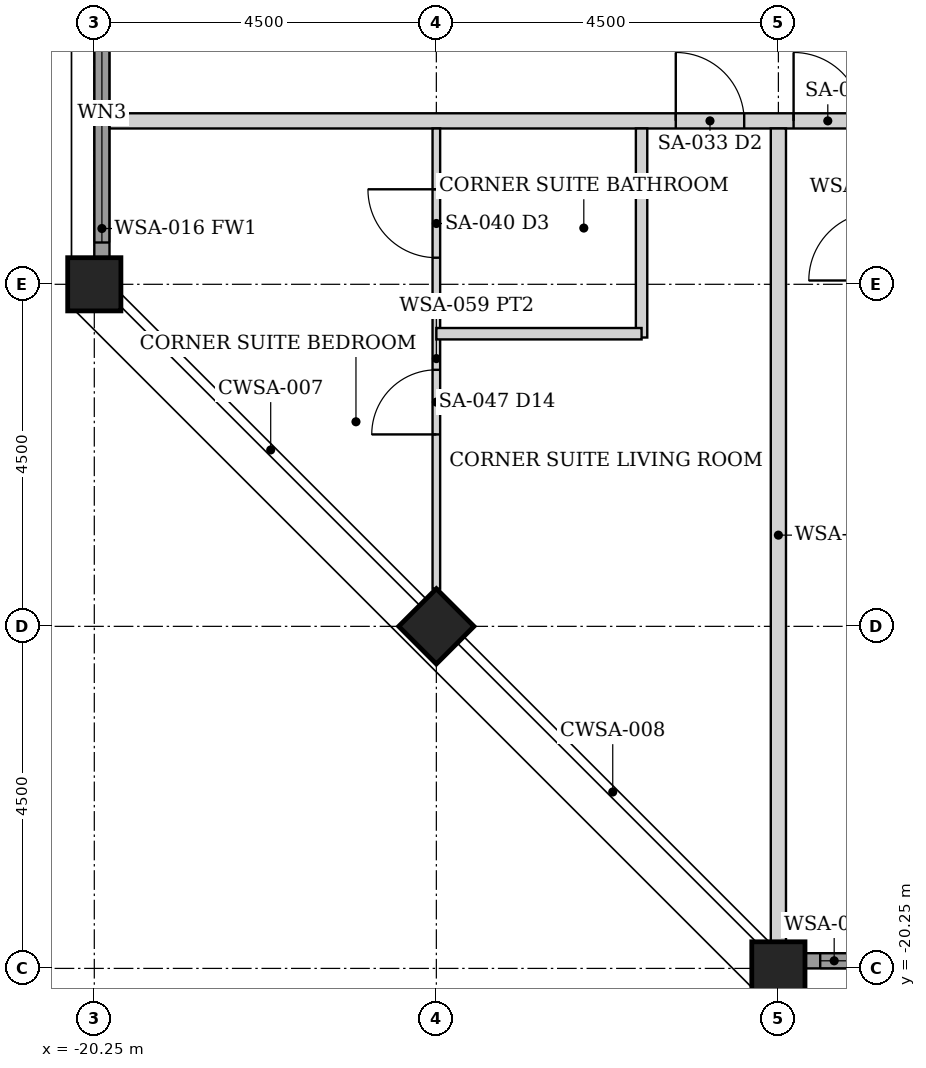
"""IFC4 building model, lengths in metres.
Left out: names, types, materials, properties, quantities, classifications, styles, units other than length and angle.
Written with IfcOpenShell. Run it as: python <this file> out.ifc"""

import sys

from ifc_helpers import new_model, si_unit, direction, frame, frame_2d, origin, origin_2d, place, context, subcontext, project, spatial, rectangle, hollow_rectangle, extrude, element, fill, save


model = new_model("IFC4")
c1 = context("Model", 3, precision=1e-05, world=origin(), true_north=direction((0.0, 1.0)))
c2 = subcontext(c1, "Body", "Model", "MODEL_VIEW")
j1 = project(units=[si_unit("LENGTHUNIT", "METRE"), si_unit("PLANEANGLEUNIT", "RADIAN")], contexts=[c1])
p1 = place(None, origin())
s1 = spatial("IfcSite", under=j1, at=p1, CompositionType="ELEMENT")
p2 = place(p1, origin())
s2 = spatial("IfcBuilding", under=s1, at=p2, CompositionType="ELEMENT")
p3 = place(p2, frame((0.0, 0.0, 200.8)))
s3 = spatial("IfcBuildingStorey", under=s2, at=p3, CompositionType="ELEMENT", Elevation=200.8)
for number, where, z_axis, x_axis in (
    (1, (-11.25, -20.25, 0.0), (0.0, 0.0, 1.0), (0.0, 1.0, 0.0)),
    (2, (-20.25, -11.25, 0.0), (0.0, 0.0, 1.0), (1.0, 0.0, 0.0)),
    (3, (-15.75, -15.75, 0.0), (0.0, 0.0, 1.0), (0.707, 0.707, 0.0)),
):
    element("IfcColumn", number, at=place(p3, frame(where, z_axis=z_axis, x_axis=x_axis)), inside=s3, PredefinedType="COLUMN", context=c2, shape_type="SweptSolid", body=[
        extrude(hollow_rectangle(XDim=0.7, YDim=0.7, WallThickness=0.045, at=origin_2d()), origin(), (0.0, 0.0, 1.0), 3.75),
    ])
p4 = place(p3, frame((-10.895, -20.15, 0.0), z_axis=(0.0, 0.0, 1.0), x_axis=(1.0, 0.0, 0.0)))
e4 = element("IfcWall", 4, at=p4, inside=s3, PredefinedType="SOLIDWALL", context=c2, shape_type="SweptSolid", body=[
    extrude(rectangle(XDim=3.79, YDim=0.2, at=frame_2d((1.895, 0.0))), origin(), (0.0, 0.0, 1.0), 2.629),
])
p5 = place(p4, frame((0.195, 0.0, 0.3)))
e5 = element("IfcOpeningElement", 5, at=p5, cuts=e4, PredefinedType="OPENING", context=c2, shape_type="SweptSolid", body=[
    extrude(rectangle(XDim=3.4, YDim=2.179, at=frame_2d((1.7, 1.089))), frame((0.0, 0.11, 0.0), z_axis=(0.0, -1.0, 0.0), x_axis=(1.0, 0.0, 0.0)), (0.0, 0.0, 1.0), 0.22),
])
p6 = place(p3, frame((-20.15, -10.895, 0.0), z_axis=(0.0, 0.0, 1.0), x_axis=(0.0, 1.0, 0.0)))
e6 = element("IfcWall", 6, at=p6, inside=s3, PredefinedType="SOLIDWALL", context=c2, shape_type="SweptSolid", body=[
    extrude(rectangle(XDim=3.79, YDim=0.2, at=frame_2d((1.895, 0.0))), origin(), (0.0, 0.0, 1.0), 2.629),
])
p7 = place(p6, frame((0.195, 0.0, 0.3)))
e7 = element("IfcOpeningElement", 7, at=p7, cuts=e6, PredefinedType="OPENING", context=c2, shape_type="SweptSolid", body=[
    extrude(rectangle(XDim=3.4, YDim=2.179, at=frame_2d((1.7, 1.089))), frame((0.0, 0.11, 0.0), z_axis=(0.0, -1.0, 0.0), x_axis=(1.0, 0.0, 0.0)), (0.0, 0.0, 1.0), 0.22),
])
p8 = place(p3, frame((-20.05, -9.1, 0.0), z_axis=(0.0, 0.0, 1.0), x_axis=(1.0, 0.0, 0.0)))
e8 = element("IfcWall", 8, at=p8, inside=s3, PredefinedType="PARTITIONING", context=c2, shape_type="SweptSolid", body=[
    extrude(rectangle(XDim=40.1, YDim=0.2, at=frame_2d((20.05, 0.0))), origin(), (0.0, 0.0, 1.0), 2.629),
])
p9 = place(p8, frame((9.0, 0.0, 0.0)))
e9 = element("IfcOpeningElement", 9, at=p9, cuts=e8, PredefinedType="OPENING", context=c2, shape_type="SweptSolid", body=[
    extrude(rectangle(XDim=0.9, YDim=2.1, at=frame_2d((0.45, 1.05))), frame((0.0, 0.11, 0.0), z_axis=(0.0, -1.0, 0.0), x_axis=(1.0, 0.0, 0.0)), (0.0, 0.0, 1.0), 0.22),
])
p10 = place(p8, frame((13.5, 0.0, 0.0)))
e10 = element("IfcOpeningElement", 10, at=p10, cuts=e8, PredefinedType="OPENING", context=c2, shape_type="SweptSolid", body=[
    extrude(rectangle(XDim=0.9, YDim=2.1, at=frame_2d((0.45, 1.05))), frame((0.0, 0.11, 0.0), z_axis=(0.0, -1.0, 0.0), x_axis=(1.0, 0.0, 0.0)), (0.0, 0.0, 1.0), 0.22),
])
p11 = place(p8, frame((18.0, 0.0, 0.0)))
e11 = element("IfcOpeningElement", 11, at=p11, cuts=e8, PredefinedType="OPENING", context=c2, shape_type="SweptSolid", body=[
    extrude(rectangle(XDim=0.9, YDim=2.1, at=frame_2d((0.45, 1.05))), frame((0.0, 0.11, 0.0), z_axis=(0.0, -1.0, 0.0), x_axis=(1.0, 0.0, 0.0)), (0.0, 0.0, 1.0), 0.22),
])
p12 = place(p8, frame((22.5, 0.0, 0.0)))
e12 = element("IfcOpeningElement", 12, at=p12, cuts=e8, PredefinedType="OPENING", context=c2, shape_type="SweptSolid", body=[
    extrude(rectangle(XDim=0.9, YDim=2.1, at=frame_2d((0.45, 1.05))), frame((0.0, 0.11, 0.0), z_axis=(0.0, -1.0, 0.0), x_axis=(1.0, 0.0, 0.0)), (0.0, 0.0, 1.0), 0.22),
])
p13 = place(p8, frame((27.0, 0.0, 0.0)))
e13 = element("IfcOpeningElement", 13, at=p13, cuts=e8, PredefinedType="OPENING", context=c2, shape_type="SweptSolid", body=[
    extrude(rectangle(XDim=0.9, YDim=2.1, at=frame_2d((0.45, 1.05))), frame((0.0, 0.11, 0.0), z_axis=(0.0, -1.0, 0.0), x_axis=(1.0, 0.0, 0.0)), (0.0, 0.0, 1.0), 0.22),
])
p14 = place(p8, frame((31.75, 0.0, 0.0)))
e14 = element("IfcOpeningElement", 14, at=p14, cuts=e8, PredefinedType="OPENING", context=c2, shape_type="SweptSolid", body=[
    extrude(rectangle(XDim=0.9, YDim=2.1, at=frame_2d((0.45, 1.05))), frame((0.0, 0.11, 0.0), z_axis=(0.0, -1.0, 0.0), x_axis=(1.0, 0.0, 0.0)), (0.0, 0.0, 1.0), 0.22),
])
p15 = place(p8, frame((7.45, 0.0, 0.0)))
e15 = element("IfcOpeningElement", 15, at=p15, cuts=e8, PredefinedType="OPENING", context=c2, shape_type="SweptSolid", body=[
    extrude(rectangle(XDim=0.9, YDim=2.1, at=frame_2d((0.45, 1.05))), frame((0.0, 0.11, 0.0), z_axis=(0.0, -1.0, 0.0), x_axis=(1.0, 0.0, 0.0)), (0.0, 0.0, 1.0), 0.22),
])
p16 = place(p3, frame((-11.25, -19.9, 0.0), z_axis=(0.0, 0.0, 1.0), x_axis=(0.0, 1.0, 0.0)))
e16 = element("IfcWall", 16, at=p16, inside=s3, PredefinedType="PARTITIONING", context=c2, shape_type="SweptSolid", body=[
    extrude(rectangle(XDim=10.7, YDim=0.2, at=frame_2d((5.35, 0.0))), origin(), (0.0, 0.0, 1.0), 2.629),
])
p17 = place(p3, frame((-15.75, -15.255, 0.0), z_axis=(0.0, 0.0, 1.0), x_axis=(0.0, 1.0, 0.0)))
e17 = element("IfcWall", 17, at=p17, inside=s3, PredefinedType="PARTITIONING", context=c2, shape_type="SweptSolid", body=[
    extrude(rectangle(XDim=6.055, YDim=0.1, at=frame_2d((3.027, 0.0))), origin(), (0.0, 0.0, 1.0), 2.629),
])
p18 = place(p17, frame((2.03, 0.0, 0.0)))
e18 = element("IfcOpeningElement", 18, at=p18, cuts=e17, PredefinedType="OPENING", context=c2, shape_type="SweptSolid", body=[
    extrude(rectangle(XDim=0.85, YDim=2.1, at=frame_2d((0.425, 1.05))), frame((0.0, 0.06, 0.0), z_axis=(0.0, -1.0, 0.0), x_axis=(1.0, 0.0, 0.0)), (0.0, 0.0, 1.0), 0.12),
])
p19 = place(p17, frame((4.355, 0.0, 0.0)))
e19 = element("IfcOpeningElement", 19, at=p19, cuts=e17, PredefinedType="OPENING", context=c2, shape_type="SweptSolid", body=[
    extrude(rectangle(XDim=0.9, YDim=2.1, at=frame_2d((0.45, 1.05))), frame((0.0, 0.06, 0.0), z_axis=(0.0, -1.0, 0.0), x_axis=(1.0, 0.0, 0.0)), (0.0, 0.0, 1.0), 0.12),
])
p20 = place(p3, frame((-13.05, -11.95, 0.0), z_axis=(0.0, 0.0, 1.0), x_axis=(0.0, 1.0, 0.0)))
e20 = element("IfcWall", 20, at=p20, inside=s3, PredefinedType="PARTITIONING", context=c2, shape_type="SweptSolid", body=[
    extrude(rectangle(XDim=2.75, YDim=0.15, at=frame_2d((1.375, 0.0))), origin(), (0.0, 0.0, 1.0), 2.629),
])
p21 = place(p3, frame((-15.75, -11.9, 0.0), z_axis=(0.0, 0.0, 1.0), x_axis=(1.0, 0.0, 0.0)))
e21 = element("IfcWall", 21, at=p21, inside=s3, PredefinedType="PARTITIONING", context=c2, shape_type="SweptSolid", body=[
    extrude(rectangle(XDim=2.7, YDim=0.15, at=frame_2d((1.35, 0.0))), origin(), (0.0, 0.0, 1.0), 2.629),
])
p22 = place(p5, origin())
e22 = element("IfcWindow", 22, at=p22, inside=s3, PartitioningType="SINGLE_PANEL", PredefinedType="WINDOW", context=c2, shape_type="SweptSolid", body=[
    extrude(rectangle(XDim=3.4, YDim=2.179, at=frame_2d((1.7, 1.089))), frame((0.0, 0.03, 0.0), z_axis=(0.0, -1.0, 0.0), x_axis=(1.0, 0.0, 0.0)), (0.0, 0.0, 1.0), 0.06),
])
fill(e5, e22)
p23 = place(p7, origin())
e23 = element("IfcWindow", 23, at=p23, inside=s3, PartitioningType="SINGLE_PANEL", PredefinedType="WINDOW", context=c2, shape_type="SweptSolid", body=[
    extrude(rectangle(XDim=3.4, YDim=2.179, at=frame_2d((1.7, 1.089))), frame((0.0, 0.03, 0.0), z_axis=(0.0, -1.0, 0.0), x_axis=(1.0, 0.0, 0.0)), (0.0, 0.0, 1.0), 0.06),
])
fill(e7, e23)
p24 = place(p9, origin())
e24 = element("IfcDoor", 24, at=p24, inside=s3, OperationType="SINGLE_SWING_LEFT", PredefinedType="DOOR", context=c2, shape_type="SweptSolid", body=[
    extrude(rectangle(XDim=0.9, YDim=2.1, at=frame_2d((0.45, 1.05))), frame((0.0, 0.025, 0.0), z_axis=(0.0, -1.0, 0.0), x_axis=(1.0, 0.0, 0.0)), (0.0, 0.0, 1.0), 0.05),
])
fill(e9, e24)
p25 = place(p15, origin())
e25 = element("IfcDoor", 25, at=p25, inside=s3, OperationType="SINGLE_SWING_LEFT", PredefinedType="DOOR", context=c2, shape_type="SweptSolid", body=[
    extrude(rectangle(XDim=0.9, YDim=2.1, at=frame_2d((0.45, 1.05))), frame((0.0, 0.025, 0.0), z_axis=(0.0, -1.0, 0.0), x_axis=(1.0, 0.0, 0.0)), (0.0, 0.0, 1.0), 0.05),
])
fill(e15, e25)
p26 = place(p18, origin())
e26 = element("IfcDoor", 26, at=p26, inside=s3, OperationType="SINGLE_SWING_LEFT", PredefinedType="DOOR", context=c2, shape_type="SweptSolid", body=[
    extrude(rectangle(XDim=0.85, YDim=2.1, at=frame_2d((0.425, 1.05))), frame((0.0, 0.025, 0.0), z_axis=(0.0, -1.0, 0.0), x_axis=(1.0, 0.0, 0.0)), (0.0, 0.0, 1.0), 0.05),
])
fill(e18, e26)
p27 = place(p19, origin())
e27 = element("IfcDoor", 27, at=p27, inside=s3, OperationType="SINGLE_SWING_RIGHT", PredefinedType="DOOR", context=c2, shape_type="SweptSolid", body=[
    extrude(rectangle(XDim=0.9, YDim=2.1, at=frame_2d((0.45, 1.05))), frame((0.0, 0.025, 0.0), z_axis=(0.0, -1.0, 0.0), x_axis=(1.0, 0.0, 0.0)), (0.0, 0.0, 1.0), 0.05),
])
fill(e19, e27)
save(model, sys.argv[1])
